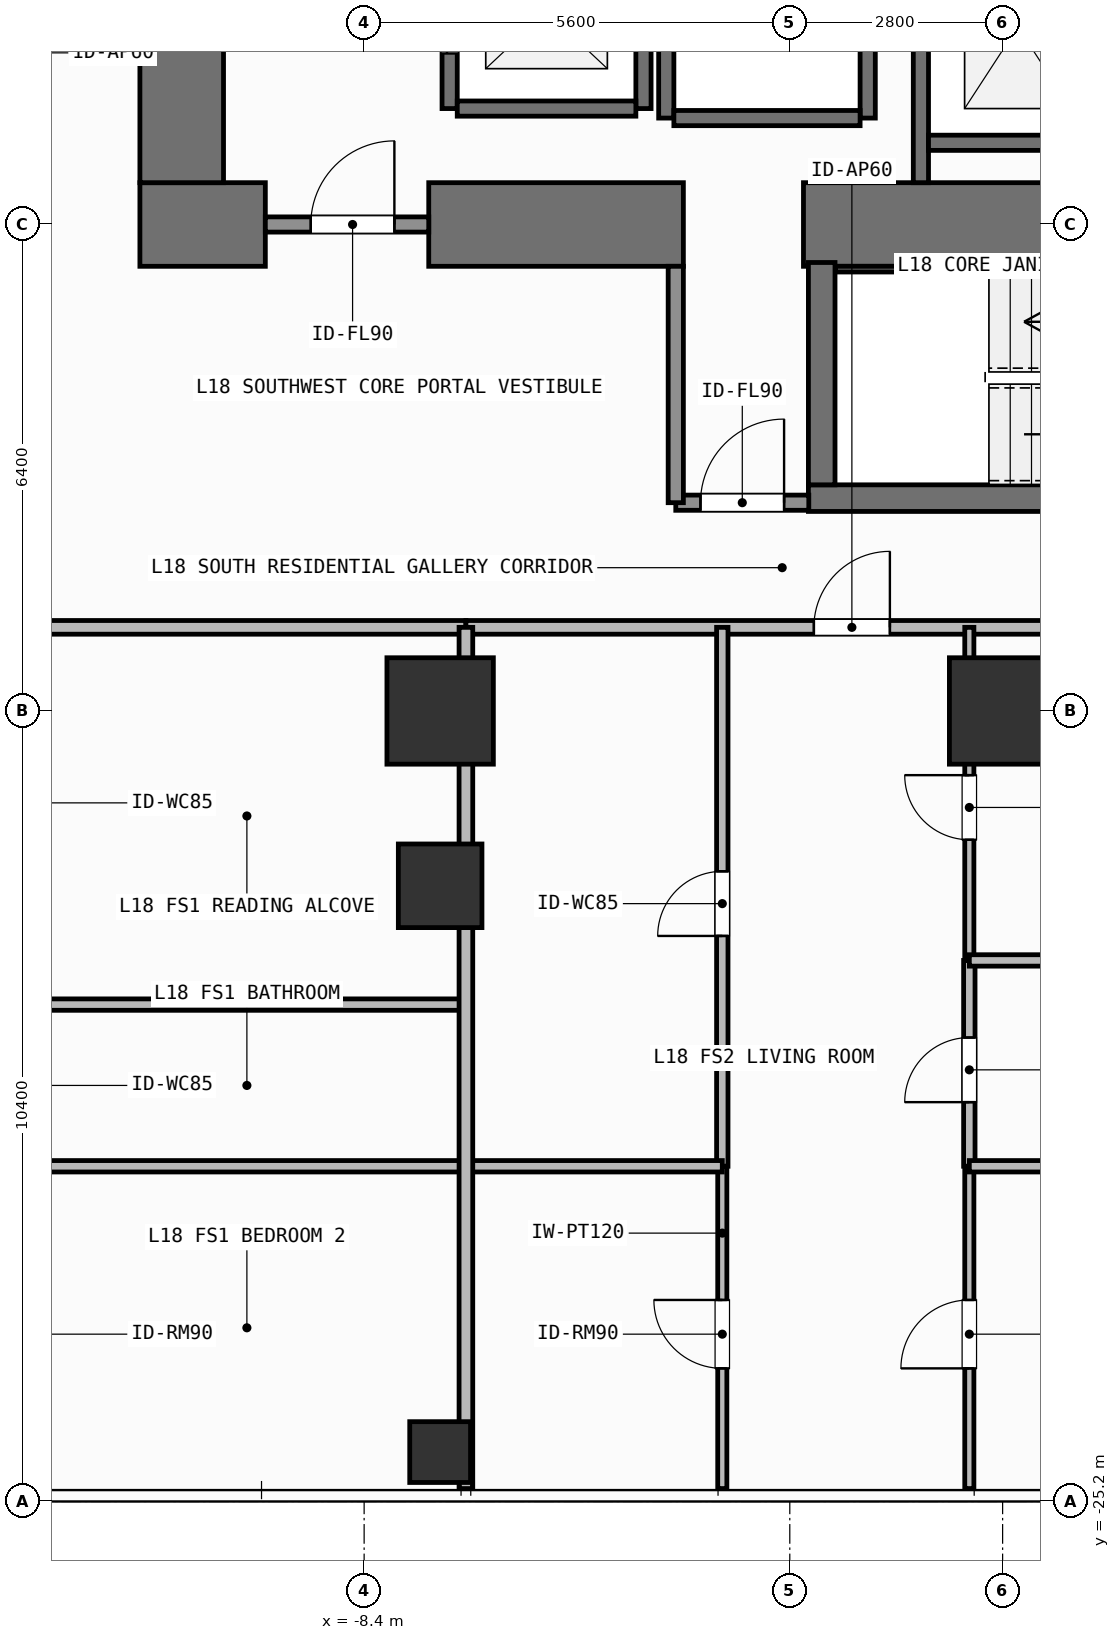
"""IFC4 building model, lengths in metres.
Left out: names, types, materials, properties, quantities, classifications, styles, units other than length and angle.
Written with IfcOpenShell. Run it as: python <this file> out.ifc"""

import sys

from ifc_helpers import new_model, si_unit, direction, frame, frame_2d, origin, origin_2d, place, context, subcontext, project, spatial, rectangle, hollow_rectangle, extrude, element, fill, save


model = new_model("IFC4")
c1 = context("Model", 3, precision=1e-05, world=origin(), true_north=direction((0.0, 1.0)))
c2 = subcontext(c1, "Body", "Model", "MODEL_VIEW")
j1 = project(units=[si_unit("LENGTHUNIT", "METRE"), si_unit("PLANEANGLEUNIT", "RADIAN")], contexts=[c1])
p1 = place(None, origin())
s1 = spatial("IfcSite", under=j1, at=p1, CompositionType="ELEMENT")
p2 = place(p1, origin())
s2 = spatial("IfcBuilding", under=s1, at=p2, CompositionType="ELEMENT")
p3 = place(p2, frame((0.0, 0.0, 69.6)))
s3 = spatial("IfcBuildingStorey", under=s2, at=p3, CompositionType="ELEMENT", Elevation=69.6)
p4 = place(p3, frame((-11.35, -8.4, 0.0), z_axis=(0.0, 0.0, 1.0), x_axis=(1.0, 0.0, 0.0)))
e1 = element("IfcWall", 1, at=p4, inside=s3, PredefinedType="SHEAR", context=c2, shape_type="SweptSolid", body=[
    extrude(rectangle(XDim=1.65, YDim=1.1, at=frame_2d((0.825, 0.0))), origin(), (0.0, 0.0, 1.0), 3.9),
])
p5 = place(p3, frame((-7.55, -8.4, 0.0), z_axis=(0.0, 0.0, 1.0), x_axis=(1.0, 0.0, 0.0)))
e2 = element("IfcWall", 2, at=p5, inside=s3, PredefinedType="SHEAR", context=c2, shape_type="SweptSolid", body=[
    extrude(rectangle(XDim=3.35, YDim=1.1, at=frame_2d((1.675, 0.0))), origin(), (0.0, 0.0, 1.0), 3.9),
])
p6 = place(p3, frame((-2.62, -8.4, 0.0), z_axis=(0.0, 0.0, 1.0), x_axis=(1.0, 0.0, 0.0)))
e3 = element("IfcWall", 3, at=p6, inside=s3, PredefinedType="SHEAR", context=c2, shape_type="SweptSolid", body=[
    extrude(rectangle(XDim=7.27, YDim=1.1, at=frame_2d((3.635, 0.0))), origin(), (0.0, 0.0, 1.0), 3.9),
])
p7 = place(p3, frame((-10.8, -7.85, 0.0), z_axis=(0.0, 0.0, 1.0), x_axis=(0.0, 1.0, 0.0)))
e4 = element("IfcWall", 4, at=p7, inside=s3, PredefinedType="SHEAR", context=c2, shape_type="SweptSolid", body=[
    extrude(rectangle(XDim=15.7, YDim=1.1, at=frame_2d((7.85, 0.0))), origin(), (0.0, 0.0, 1.0), 3.9),
])
p8 = place(p3, frame((-2.555, -12.0, 0.0), z_axis=(0.0, 0.0, 1.0), x_axis=(1.0, 0.0, 0.0)))
e5 = element("IfcWall", 5, at=p8, inside=s3, PredefinedType="SHEAR", context=c2, shape_type="SweptSolid", body=[
    extrude(rectangle(XDim=7.31, YDim=0.35, at=frame_2d((3.655, 0.0))), origin(), (0.0, 0.0, 1.0), 3.9),
])
p9 = place(p3, frame((-2.2, -8.988, 0.0), z_axis=(0.0, 0.0, 1.0), x_axis=(1.0, 0.0, 0.0)))
e6 = element("IfcWall", 6, at=p9, inside=s3, PredefinedType="SHEAR", context=c2, shape_type="SweptSolid", body=[
    extrude(rectangle(XDim=6.6, YDim=0.075, at=frame_2d((3.3, 0.0))), origin(), (0.0, 0.0, 1.0), 3.9),
])
p10 = place(p3, frame((-2.38, -11.825, 0.0), z_axis=(0.0, 0.0, 1.0), x_axis=(0.0, 1.0, 0.0)))
e7 = element("IfcWall", 7, at=p10, inside=s3, PredefinedType="SHEAR", context=c2, shape_type="SweptSolid", body=[
    extrude(rectangle(XDim=2.925, YDim=0.35, at=frame_2d((1.462, 0.0))), origin(), (0.0, 0.0, 1.0), 3.9),
])
for number, where, z_axis, x_axis in (
    (8, (-7.4, -14.8, 0.0), (0.0, 0.0, 1.0), (1.0, 0.0, 0.0)),
    (9, (0.0, -14.8, 0.0), (0.0, 0.0, 1.0), (1.0, 0.0, 0.0)),
):
    element("IfcColumn", number, at=place(p3, frame(where, z_axis=z_axis, x_axis=x_axis)), inside=s3, PredefinedType="COLUMN", context=c2, shape_type="SweptSolid", body=[
        extrude(rectangle(XDim=1.4, YDim=1.4, at=origin_2d()), origin(), (0.0, 0.0, 1.0), 3.9),
    ])
p11 = place(p3, frame((-7.4, -17.1, 0.0), z_axis=(0.0, 0.0, 1.0), x_axis=(1.0, 0.0, 0.0)))
e10 = element("IfcColumn", 10, at=p11, inside=s3, PredefinedType="COLUMN", context=c2, shape_type="SweptSolid", body=[
    extrude(rectangle(XDim=1.1, YDim=1.1, at=origin_2d()), origin(), (0.0, 0.0, 1.0), 3.9),
])
p12 = place(p3, frame((-7.4, -24.55, 0.0), z_axis=(0.0, 0.0, 1.0), x_axis=(1.0, 0.0, 0.0)))
e11 = element("IfcColumn", 11, at=p12, inside=s3, PredefinedType="COLUMN", context=c2, shape_type="SweptSolid", body=[
    extrude(hollow_rectangle(XDim=0.8, YDim=0.8, WallThickness=0.036, at=origin_2d()), origin(), (0.0, 0.0, 1.0), 3.9),
])
p13 = place(p3, frame((-7.275, -6.875, 0.0), z_axis=(0.0, 0.0, 1.0), x_axis=(0.0, 1.0, 0.0)))
e12 = element("IfcWall", 12, at=p13, inside=s3, PredefinedType="SHEAR", context=c2, shape_type="SweptSolid", body=[
    extrude(rectangle(XDim=2.55, YDim=0.2, at=frame_2d((1.275, 0.0))), origin(), (0.0, 0.0, 1.0), 3.68),
])
p14 = place(p13, frame((0.725, 0.0, 0.0)))
e13 = element("IfcOpeningElement", 13, at=p14, cuts=e12, PredefinedType="OPENING", context=c2, shape_type="SweptSolid", body=[
    extrude(rectangle(XDim=1.1, YDim=2.2, at=frame_2d((0.55, 1.1))), frame((0.0, 0.11, 0.0), z_axis=(0.0, -1.0, 0.0), x_axis=(1.0, 0.0, 0.0)), (0.0, 0.0, 1.0), 0.22),
])
p15 = place(p3, frame((-4.725, -6.875, 0.0), z_axis=(0.0, 0.0, 1.0), x_axis=(0.0, 1.0, 0.0)))
e14 = element("IfcWall", 14, at=p15, inside=s3, PredefinedType="SHEAR", context=c2, shape_type="SweptSolid", body=[
    extrude(rectangle(XDim=2.55, YDim=0.2, at=frame_2d((1.275, 0.0))), origin(), (0.0, 0.0, 1.0), 3.68),
])
p16 = place(p3, frame((-7.175, -6.875, 0.0), z_axis=(0.0, 0.0, 1.0), x_axis=(1.0, 0.0, 0.0)))
e15 = element("IfcWall", 15, at=p16, inside=s3, PredefinedType="SHEAR", context=c2, shape_type="SweptSolid", body=[
    extrude(rectangle(XDim=2.35, YDim=0.2, at=frame_2d((1.175, 0.0))), origin(), (0.0, 0.0, 1.0), 3.68),
])
for number, where, z_axis, x_axis in (
    (16, (-4.425, -7.0, 0.0), (0.0, 0.0, 1.0), (0.0, 1.0, 0.0)),
    (17, (-1.775, -7.0, 0.0), (0.0, 0.0, 1.0), (0.0, 1.0, 0.0)),
):
    element("IfcWall", number, at=place(p3, frame(where, z_axis=z_axis, x_axis=x_axis)), inside=s3, PredefinedType="SHEAR", context=c2, shape_type="SweptSolid", body=[
        extrude(rectangle(XDim=2.8, YDim=0.2, at=frame_2d((1.4, 0.0))), origin(), (0.0, 0.0, 1.0), 3.68),
    ])
p17 = place(p3, frame((-4.325, -7.0, 0.0), z_axis=(0.0, 0.0, 1.0), x_axis=(1.0, 0.0, 0.0)))
e18 = element("IfcWall", 18, at=p17, inside=s3, PredefinedType="SHEAR", context=c2, shape_type="SweptSolid", body=[
    extrude(rectangle(XDim=2.45, YDim=0.2, at=frame_2d((1.225, 0.0))), origin(), (0.0, 0.0, 1.0), 3.68),
])
p18 = place(p3, frame((-1.075, -7.85, 0.0), z_axis=(0.0, 0.0, 1.0), x_axis=(0.0, 1.0, 0.0)))
e19 = element("IfcWall", 19, at=p18, inside=s3, PredefinedType="SHEAR", context=c2, shape_type="SweptSolid", body=[
    extrude(rectangle(XDim=3.575, YDim=0.2, at=frame_2d((1.788, 0.0))), origin(), (0.0, 0.0, 1.0), 3.68),
])
p19 = place(p3, frame((-0.975, -7.325, 0.0), z_axis=(0.0, 0.0, 1.0), x_axis=(1.0, 0.0, 0.0)))
e20 = element("IfcWall", 20, at=p19, inside=s3, PredefinedType="SHEAR", context=c2, shape_type="SweptSolid", body=[
    extrude(rectangle(XDim=2.35, YDim=0.2, at=frame_2d((1.175, 0.0))), origin(), (0.0, 0.0, 1.0), 3.68),
])
p20 = place(p3, frame((-9.7, -8.4, 0.0), z_axis=(0.0, 0.0, 1.0), x_axis=(1.0, 0.0, 0.0)))
e21 = element("IfcWall", 21, at=p20, inside=s3, PredefinedType="SOLIDWALL", context=c2, shape_type="SweptSolid", body=[
    extrude(rectangle(XDim=2.15, YDim=0.2, at=frame_2d((1.075, 0.0))), origin(), (0.0, 0.0, 1.0), 2.72),
])
p21 = place(p20, frame((0.598, 0.0, 0.0)))
e22 = element("IfcOpeningElement", 22, at=p21, cuts=e21, PredefinedType="OPENING", context=c2, shape_type="SweptSolid", body=[
    extrude(rectangle(XDim=1.1, YDim=2.15, at=frame_2d((0.55, 1.075))), frame((0.0, 0.11, 0.0), z_axis=(0.0, -1.0, 0.0), x_axis=(1.0, 0.0, 0.0)), (0.0, 0.0, 1.0), 0.22),
])
p22 = place(p3, frame((-4.3, -12.06, 0.0), z_axis=(0.0, 0.0, 1.0), x_axis=(1.0, 0.0, 0.0)))
e23 = element("IfcWall", 23, at=p22, inside=s3, PredefinedType="SOLIDWALL", context=c2, shape_type="SweptSolid", body=[
    extrude(rectangle(XDim=1.75, YDim=0.2, at=frame_2d((0.875, 0.0))), origin(), (0.0, 0.0, 1.0), 3.68),
])
p23 = place(p22, frame((0.325, 0.0, 0.0)))
e24 = element("IfcOpeningElement", 24, at=p23, cuts=e23, PredefinedType="OPENING", context=c2, shape_type="SweptSolid", body=[
    extrude(rectangle(XDim=1.1, YDim=2.15, at=frame_2d((0.55, 1.075))), frame((0.0, 0.11, 0.0), z_axis=(0.0, -1.0, 0.0), x_axis=(1.0, 0.0, 0.0)), (0.0, 0.0, 1.0), 0.22),
])
p24 = place(p3, frame((-24.42, -13.7, 0.0), z_axis=(0.0, 0.0, 1.0), x_axis=(1.0, 0.0, 0.0)))
e25 = element("IfcWall", 25, at=p24, inside=s3, PredefinedType="PARTITIONING", context=c2, shape_type="SweptSolid", body=[
    extrude(rectangle(XDim=17.359, YDim=0.18, at=frame_2d((8.679, 0.0))), origin(), (0.0, 0.0, 1.0), 3.68),
])
p25 = place(p24, frame((7.288, 0.0, 0.0)))
e26 = element("IfcOpeningElement", 26, at=p25, cuts=e25, PredefinedType="OPENING", context=c2, shape_type="SweptSolid", body=[
    extrude(rectangle(XDim=1.0, YDim=2.2, at=frame_2d((0.5, 1.1))), frame((0.0, 0.1, 0.0), z_axis=(0.0, -1.0, 0.0), x_axis=(1.0, 0.0, 0.0)), (0.0, 0.0, 1.0), 0.2),
])
p26 = place(p3, frame((-7.061, -13.7, 0.0), z_axis=(0.0, 0.0, 1.0), x_axis=(1.0, 0.0, 0.0)))
e27 = element("IfcWall", 27, at=p26, inside=s3, PredefinedType="PARTITIONING", context=c2, shape_type="SweptSolid", body=[
    extrude(rectangle(XDim=9.979, YDim=0.18, at=frame_2d((4.99, 0.0))), origin(), (0.0, 0.0, 1.0), 3.68),
])
p27 = place(p26, frame((4.578, 0.0, 0.0)))
e28 = element("IfcOpeningElement", 28, at=p27, cuts=e27, PredefinedType="OPENING", context=c2, shape_type="SweptSolid", body=[
    extrude(rectangle(XDim=1.0, YDim=2.2, at=frame_2d((0.5, 1.1))), frame((0.0, 0.1, 0.0), z_axis=(0.0, -1.0, 0.0), x_axis=(1.0, 0.0, 0.0)), (0.0, 0.0, 1.0), 0.2),
])
p28 = place(p3, frame((-3.688, -20.79, 0.0), z_axis=(0.0, 0.0, 1.0), x_axis=(0.0, 1.0, 0.0)))
e29 = element("IfcWall", 29, at=p28, inside=s3, PredefinedType="PARTITIONING", context=c2, shape_type="SweptSolid", body=[
    extrude(rectangle(XDim=7.09, YDim=0.15, at=frame_2d((3.545, 0.0))), origin(), (0.0, 0.0, 1.0), 3.68),
])
p29 = place(p28, frame((3.03, 0.0, 0.0)))
e30 = element("IfcOpeningElement", 30, at=p29, cuts=e29, PredefinedType="OPENING", context=c2, shape_type="SweptSolid", body=[
    extrude(rectangle(XDim=0.85, YDim=2.1, at=frame_2d((0.425, 1.05))), frame((0.0, 0.085, 0.0), z_axis=(0.0, -1.0, 0.0), x_axis=(1.0, 0.0, 0.0)), (0.0, 0.0, 1.0), 0.17),
])
p30 = place(p3, frame((-3.688, -25.03, 0.0), z_axis=(0.0, 0.0, 1.0), x_axis=(0.0, 1.0, 0.0)))
e31 = element("IfcWall", 31, at=p30, inside=s3, PredefinedType="PARTITIONING", context=c2, shape_type="SweptSolid", body=[
    extrude(rectangle(XDim=4.24, YDim=0.12, at=frame_2d((2.12, 0.0))), origin(), (0.0, 0.0, 1.0), 3.68),
])
p31 = place(p30, frame((1.581, 0.0, 0.0)))
e32 = element("IfcOpeningElement", 32, at=p31, cuts=e31, PredefinedType="OPENING", context=c2, shape_type="SweptSolid", body=[
    extrude(rectangle(XDim=0.9, YDim=2.1, at=frame_2d((0.45, 1.05))), frame((0.0, 0.07, 0.0), z_axis=(0.0, -1.0, 0.0), x_axis=(1.0, 0.0, 0.0)), (0.0, 0.0, 1.0), 0.14),
])
p32 = place(p3, frame((-0.438, -20.79, 0.0), z_axis=(0.0, 0.0, 1.0), x_axis=(0.0, 1.0, 0.0)))
e33 = element("IfcWall", 33, at=p32, inside=s3, PredefinedType="PARTITIONING", context=c2, shape_type="SweptSolid", body=[
    extrude(rectangle(XDim=2.708, YDim=0.15, at=frame_2d((1.354, 0.0))), origin(), (0.0, 0.0, 1.0), 3.68),
])
p33 = place(p32, frame((0.844, 0.0, 0.0)))
e34 = element("IfcOpeningElement", 34, at=p33, cuts=e33, PredefinedType="OPENING", context=c2, shape_type="SweptSolid", body=[
    extrude(rectangle(XDim=0.85, YDim=2.1, at=frame_2d((0.425, 1.05))), frame((0.0, 0.085, 0.0), z_axis=(0.0, -1.0, 0.0), x_axis=(1.0, 0.0, 0.0)), (0.0, 0.0, 1.0), 0.17),
])
p34 = place(p3, frame((-0.438, -18.082, 0.0), z_axis=(0.0, 0.0, 1.0), x_axis=(0.0, 1.0, 0.0)))
e35 = element("IfcWall", 35, at=p34, inside=s3, PredefinedType="PARTITIONING", context=c2, shape_type="SweptSolid", body=[
    extrude(rectangle(XDim=4.382, YDim=0.12, at=frame_2d((2.191, 0.0))), origin(), (0.0, 0.0, 1.0), 3.68),
])
p35 = place(p34, frame((1.588, 0.0, 0.0)))
e36 = element("IfcOpeningElement", 36, at=p35, cuts=e35, PredefinedType="OPENING", context=c2, shape_type="SweptSolid", body=[
    extrude(rectangle(XDim=0.85, YDim=2.1, at=frame_2d((0.425, 1.05))), frame((0.0, 0.07, 0.0), z_axis=(0.0, -1.0, 0.0), x_axis=(1.0, 0.0, 0.0)), (0.0, 0.0, 1.0), 0.14),
])
p36 = place(p3, frame((-0.438, -25.03, 0.0), z_axis=(0.0, 0.0, 1.0), x_axis=(0.0, 1.0, 0.0)))
e37 = element("IfcWall", 37, at=p36, inside=s3, PredefinedType="PARTITIONING", context=c2, shape_type="SweptSolid", body=[
    extrude(rectangle(XDim=4.24, YDim=0.12, at=frame_2d((2.12, 0.0))), origin(), (0.0, 0.0, 1.0), 3.68),
])
p37 = place(p36, frame((1.581, 0.0, 0.0)))
e38 = element("IfcOpeningElement", 38, at=p37, cuts=e37, PredefinedType="OPENING", context=c2, shape_type="SweptSolid", body=[
    extrude(rectangle(XDim=0.9, YDim=2.1, at=frame_2d((0.45, 1.05))), frame((0.0, 0.07, 0.0), z_axis=(0.0, -1.0, 0.0), x_axis=(1.0, 0.0, 0.0)), (0.0, 0.0, 1.0), 0.14),
])
p38 = place(p3, frame((-4.3, -12.06, 0.0), z_axis=(0.0, 0.0, 1.0), x_axis=(0.0, 1.0, 0.0)))
e39 = element("IfcWall", 39, at=p38, inside=s3, PredefinedType="SOLIDWALL", context=c2, shape_type="SweptSolid", body=[
    extrude(rectangle(XDim=3.11, YDim=0.2, at=frame_2d((1.555, 0.0))), origin(), (0.0, 0.0, 1.0), 3.68),
])
for number, where, z_axis, x_axis in (
    (40, (-12.824, -18.663, 0.0), (0.0, 0.0, 1.0), (1.0, 0.0, 0.0)),
    (41, (-12.824, -20.79, 0.0), (0.0, 0.0, 1.0), (1.0, 0.0, 0.0)),
):
    element("IfcWall", number, at=place(p3, frame(where, z_axis=z_axis, x_axis=x_axis)), inside=s3, PredefinedType="PARTITIONING", context=c2, shape_type="SweptSolid", body=[
        extrude(rectangle(XDim=5.763, YDim=0.15, at=frame_2d((2.881, 0.0))), origin(), (0.0, 0.0, 1.0), 3.68),
    ])
p39 = place(p3, frame((-7.061, -20.79, 0.0), z_axis=(0.0, 0.0, 1.0), x_axis=(1.0, 0.0, 0.0)))
e42 = element("IfcWall", 42, at=p39, inside=s3, PredefinedType="PARTITIONING", context=c2, shape_type="SweptSolid", body=[
    extrude(rectangle(XDim=3.373, YDim=0.15, at=frame_2d((1.687, 0.0))), origin(), (0.0, 0.0, 1.0), 3.68),
])
for number, where, z_axis, x_axis in (
    (43, (-0.438, -18.082, 0.0), (0.0, 0.0, 1.0), (1.0, 0.0, 0.0)),
    (44, (-0.438, -20.79, 0.0), (0.0, 0.0, 1.0), (1.0, 0.0, 0.0)),
):
    element("IfcWall", number, at=place(p3, frame(where, z_axis=z_axis, x_axis=x_axis)), inside=s3, PredefinedType="PARTITIONING", context=c2, shape_type="SweptSolid", body=[
        extrude(rectangle(XDim=3.356, YDim=0.15, at=frame_2d((1.678, 0.0))), origin(), (0.0, 0.0, 1.0), 3.68),
    ])
p40 = place(p3, frame((-7.061, -25.03, 0.0), z_axis=(0.0, 0.0, 1.0), x_axis=(0.0, 1.0, 0.0)))
e45 = element("IfcWall", 45, at=p40, inside=s3, PredefinedType="PARTITIONING", context=c2, shape_type="SweptSolid", body=[
    extrude(rectangle(XDim=11.33, YDim=0.18, at=frame_2d((5.665, 0.0))), origin(), (0.0, 0.0, 1.0), 3.68),
])
p41 = place(p14, origin())
e46 = element("IfcDoor", 46, at=p41, inside=s3, OperationType="SLIDING_TO_LEFT", PredefinedType="DOOR", context=c2, shape_type="SweptSolid", body=[
    extrude(rectangle(XDim=1.1, YDim=2.2, at=frame_2d((0.55, 1.1))), frame((0.0, 0.025, 0.0), z_axis=(0.0, -1.0, 0.0), x_axis=(1.0, 0.0, 0.0)), (0.0, 0.0, 1.0), 0.05),
])
fill(e13, e46)
p42 = place(p21, origin())
e47 = element("IfcDoor", 47, at=p42, inside=s3, OperationType="SINGLE_SWING_RIGHT", PredefinedType="DOOR", context=c2, shape_type="SweptSolid", body=[
    extrude(rectangle(XDim=1.1, YDim=2.15, at=frame_2d((0.55, 1.075))), frame((0.0, 0.025, 0.0), z_axis=(0.0, -1.0, 0.0), x_axis=(1.0, 0.0, 0.0)), (0.0, 0.0, 1.0), 0.05),
])
fill(e22, e47)
p43 = place(p23, origin())
e48 = element("IfcDoor", 48, at=p43, inside=s3, OperationType="SINGLE_SWING_RIGHT", PredefinedType="DOOR", context=c2, shape_type="SweptSolid", body=[
    extrude(rectangle(XDim=1.1, YDim=2.15, at=frame_2d((0.55, 1.075))), frame((0.0, 0.025, 0.0), z_axis=(0.0, -1.0, 0.0), x_axis=(1.0, 0.0, 0.0)), (0.0, 0.0, 1.0), 0.05),
])
fill(e24, e48)
p44 = place(p27, origin())
e49 = element("IfcDoor", 49, at=p44, inside=s3, OperationType="SINGLE_SWING_RIGHT", PredefinedType="DOOR", context=c2, shape_type="SweptSolid", body=[
    extrude(rectangle(XDim=1.0, YDim=2.2, at=frame_2d((0.5, 1.1))), frame((0.0, 0.025, 0.0), z_axis=(0.0, -1.0, 0.0), x_axis=(1.0, 0.0, 0.0)), (0.0, 0.0, 1.0), 0.05),
])
fill(e28, e49)
p45 = place(p29, origin())
e50 = element("IfcDoor", 50, at=p45, inside=s3, OperationType="SINGLE_SWING_LEFT", PredefinedType="DOOR", context=c2, shape_type="SweptSolid", body=[
    extrude(rectangle(XDim=0.85, YDim=2.1, at=frame_2d((0.425, 1.05))), frame((0.0, 0.025, 0.0), z_axis=(0.0, -1.0, 0.0), x_axis=(1.0, 0.0, 0.0)), (0.0, 0.0, 1.0), 0.05),
])
fill(e30, e50)
p46 = place(p31, origin())
e51 = element("IfcDoor", 51, at=p46, inside=s3, OperationType="SINGLE_SWING_RIGHT", PredefinedType="DOOR", context=c2, shape_type="SweptSolid", body=[
    extrude(rectangle(XDim=0.9, YDim=2.1, at=frame_2d((0.45, 1.05))), frame((0.0, 0.025, 0.0), z_axis=(0.0, -1.0, 0.0), x_axis=(1.0, 0.0, 0.0)), (0.0, 0.0, 1.0), 0.05),
])
fill(e32, e51)
p47 = place(p33, origin())
e52 = element("IfcDoor", 52, at=p47, inside=s3, OperationType="SINGLE_SWING_LEFT", PredefinedType="DOOR", context=c2, shape_type="SweptSolid", body=[
    extrude(rectangle(XDim=0.85, YDim=2.1, at=frame_2d((0.425, 1.05))), frame((0.0, 0.025, 0.0), z_axis=(0.0, -1.0, 0.0), x_axis=(1.0, 0.0, 0.0)), (0.0, 0.0, 1.0), 0.05),
])
fill(e34, e52)
p48 = place(p35, origin())
e53 = element("IfcDoor", 53, at=p48, inside=s3, OperationType="SINGLE_SWING_RIGHT", PredefinedType="DOOR", context=c2, shape_type="SweptSolid", body=[
    extrude(rectangle(XDim=0.85, YDim=2.1, at=frame_2d((0.425, 1.05))), frame((0.0, 0.025, 0.0), z_axis=(0.0, -1.0, 0.0), x_axis=(1.0, 0.0, 0.0)), (0.0, 0.0, 1.0), 0.05),
])
fill(e36, e53)
p49 = place(p37, origin())
e54 = element("IfcDoor", 54, at=p49, inside=s3, OperationType="SINGLE_SWING_LEFT", PredefinedType="DOOR", context=c2, shape_type="SweptSolid", body=[
    extrude(rectangle(XDim=0.9, YDim=2.1, at=frame_2d((0.45, 1.05))), frame((0.0, 0.025, 0.0), z_axis=(0.0, -1.0, 0.0), x_axis=(1.0, 0.0, 0.0)), (0.0, 0.0, 1.0), 0.05),
])
fill(e38, e54)
save(model, sys.argv[1])
